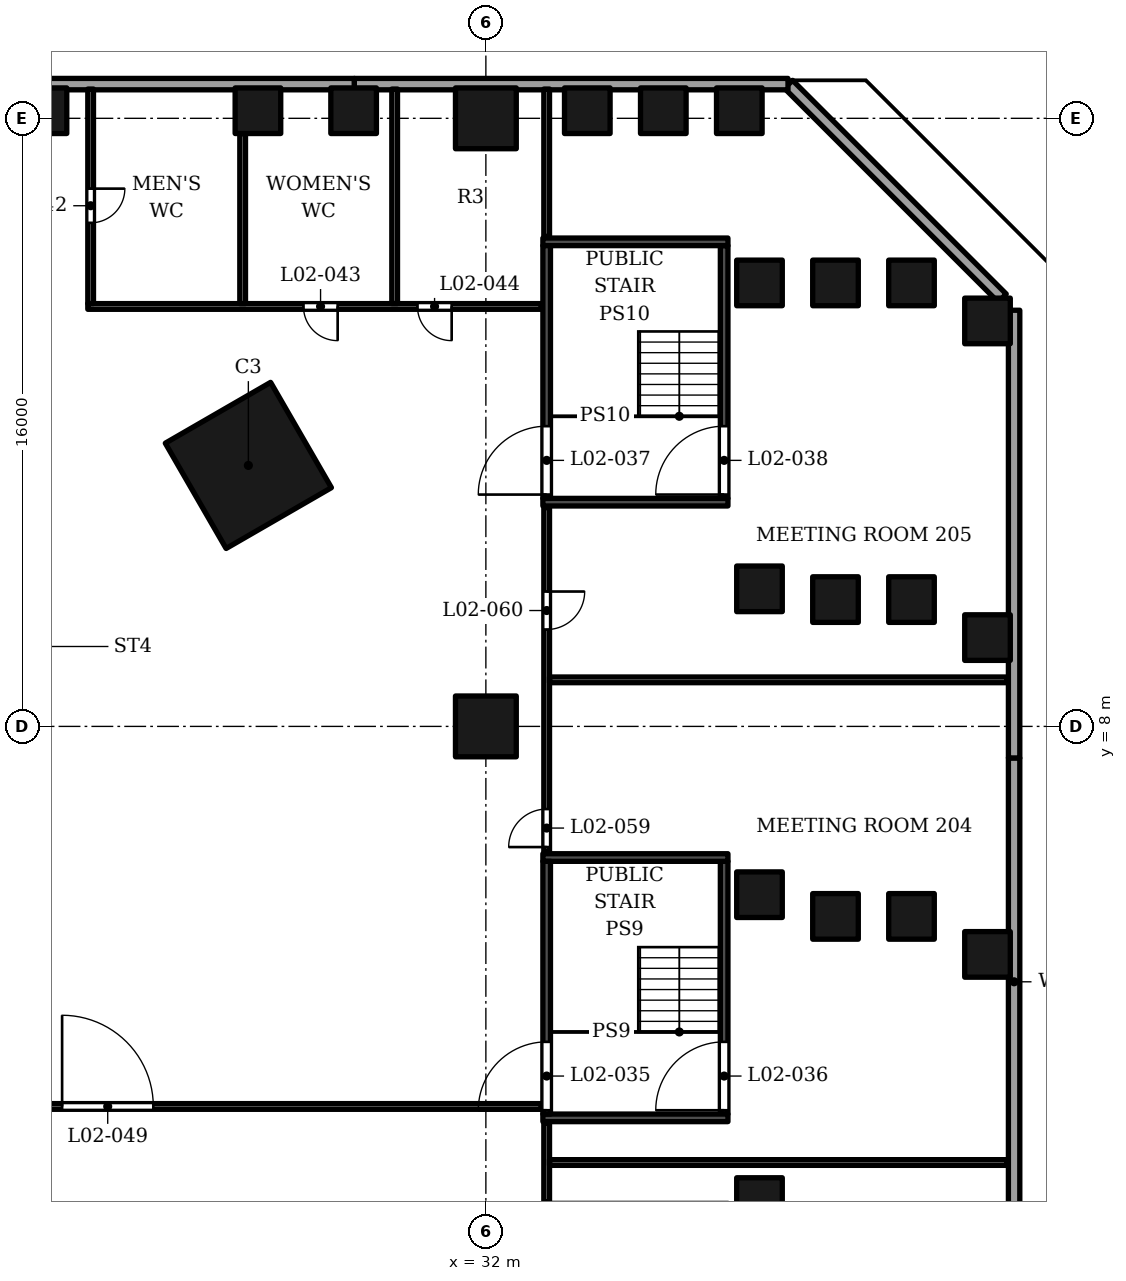
"""IFC4 building model, lengths in metres.
Left out: names, types, materials, properties, quantities, classifications, styles, units other than length and angle.
Written with IfcOpenShell. Run it as: python <this file> out.ifc"""

import sys

from ifc_helpers import new_model, si_unit, direction, frame, frame_2d, origin, origin_2d, place, context, subcontext, project, spatial, rectangle, extrude, element, fill, save


model = new_model("IFC4")
c1 = context("Model", 3, precision=1e-05, world=origin(), true_north=direction((0.0, 1.0)))
c2 = subcontext(c1, "Body", "Model", "MODEL_VIEW")
j1 = project(units=[si_unit("LENGTHUNIT", "METRE"), si_unit("PLANEANGLEUNIT", "RADIAN")], contexts=[c1])
p1 = place(None, origin())
s1 = spatial("IfcSite", under=j1, at=p1, CompositionType="ELEMENT")
p2 = place(p1, origin())
s2 = spatial("IfcBuilding", under=s1, at=p2, CompositionType="ELEMENT")
p3 = place(p2, frame((0.0, 0.0, 20.0)))
s3 = spatial("IfcBuildingStorey", under=s2, at=p3, CompositionType="ELEMENT", Elevation=20.0)
for number, where, z_axis, x_axis in (
    (1, (32.0, 8.0, 0.0), (0.0, 0.0, 1.0), (1.0, 0.0, 0.0)),
    (2, (32.0, 24.0, 0.0), (0.0, 0.0, 1.0), (1.0, 0.0, 0.0)),
):
    element("IfcColumn", number, at=place(p3, frame(where, z_axis=z_axis, x_axis=x_axis)), inside=s3, PredefinedType="COLUMN", context=c2, shape_type="SweptSolid", body=[
        extrude(rectangle(XDim=1.6, YDim=1.6, at=origin_2d()), origin(), (0.0, 0.0, 1.0), 9.0),
    ])
for number, where, z_axis, x_axis in (
    (3, (34.669, 24.2, 0.0), (0.0, 0.0, 1.0), (1.0, 0.0, 0.0)),
    (4, (39.2, 19.669, 0.0), (0.0, 0.0, 1.0), (1.0, 0.0, 0.0)),
    (5, (26.002, 24.2, 0.0), (0.0, 0.0, 1.0), (1.0, 0.0, 0.0)),
    (6, (39.2, 11.62, 0.0), (0.0, 0.0, 1.0), (1.0, 0.0, 0.0)),
    (7, (39.2, 3.572, 0.0), (0.0, 0.0, 1.0), (1.0, 0.0, 0.0)),
    (8, (39.2, -4.476, 0.0), (0.0, 0.0, 1.0), (1.0, 0.0, 0.0)),
    (9, (36.669, 24.2, 0.0), (0.0, 0.0, 1.0), (1.0, 0.0, 0.0)),
    (10, (41.2, 19.669, 0.0), (0.0, 0.0, 1.0), (1.0, 0.0, 0.0)),
    (11, (20.372, 24.2, 0.0), (0.0, 0.0, 1.0), (1.0, 0.0, 0.0)),
    (12, (28.52, 24.2, 0.0), (0.0, 0.0, 1.0), (1.0, 0.0, 0.0)),
    (13, (41.2, 11.337, 0.0), (0.0, 0.0, 1.0), (1.0, 0.0, 0.0)),
    (14, (41.2, 3.001, 0.0), (0.0, 0.0, 1.0), (1.0, 0.0, 0.0)),
    (15, (38.669, 24.2, 0.0), (0.0, 0.0, 1.0), (1.0, 0.0, 0.0)),
    (16, (43.2, 19.669, 0.0), (0.0, 0.0, 1.0), (1.0, 0.0, 0.0)),
    (17, (43.2, 11.337, 0.0), (0.0, 0.0, 1.0), (1.0, 0.0, 0.0)),
    (18, (43.2, 3.001, 0.0), (0.0, 0.0, 1.0), (1.0, 0.0, 0.0)),
    (19, (45.2, 18.669, 0.0), (0.0, 0.0, 1.0), (1.0, 0.0, 0.0)),
    (20, (45.2, 10.337, 0.0), (0.0, 0.0, 1.0), (1.0, 0.0, 0.0)),
    (21, (45.2, 2.001, 0.0), (0.0, 0.0, 1.0), (1.0, 0.0, 0.0)),
):
    element("IfcColumn", number, at=place(p3, frame(where, z_axis=z_axis, x_axis=x_axis)), inside=s3, PredefinedType="COLUMN", context=c2, shape_type="SweptSolid", body=[
        extrude(rectangle(XDim=1.2, YDim=1.2, at=origin_2d()), origin(), (0.0, 0.0, 1.0), 9.0),
    ])
p4 = place(p3, frame((25.75, 14.867, 0.0), z_axis=(0.0, 0.0, 1.0), x_axis=(-0.866025386331, -0.50000003023, 0.0)))
e22 = element("IfcColumn", 22, at=p4, inside=s3, PredefinedType="COLUMN", context=c2, shape_type="SweptSolid", body=[
    extrude(rectangle(XDim=3.2, YDim=3.2, at=origin_2d()), origin(), (0.0, 0.0, 1.0), 9.0),
])
for number, where, z_axis, x_axis in (
    (23, (45.9, -4.61, 0.0), (0.0, 0.0, 1.0), (0.0, 1.0, 0.0)),
    (24, (45.9, 7.17, 0.0), (0.0, 0.0, 1.0), (0.0, 1.0, 0.0)),
):
    element("IfcWall", number, at=place(p3, frame(where, z_axis=z_axis, x_axis=x_axis)), inside=s3, PredefinedType="SOLIDWALL", context=c2, shape_type="SweptSolid", body=[
        extrude(rectangle(XDim=11.78, YDim=0.3, at=frame_2d((5.89, 0.0))), origin(), (0.0, 0.0, 1.0), 7.6),
    ])
p5 = place(p3, frame((45.588, 19.271, 0.0), z_axis=(0.0, 0.0, 1.0), x_axis=(-0.707106781187, 0.707106781187, 0.0)))
e25 = element("IfcWall", 25, at=p5, inside=s3, PredefinedType="SOLIDWALL", context=c2, shape_type="SweptSolid", body=[
    extrude(rectangle(XDim=7.952, YDim=0.3, at=frame_2d((3.976, 0.0))), origin(), (0.0, 0.0, 1.0), 7.6),
])
for number, where, z_axis, x_axis in (
    (26, (39.95, 24.9, 0.0), (0.0, 0.0, 1.0), (-1.0, 0.0, 0.0)),
    (27, (28.536, 24.9, 0.0), (0.0, 0.0, 1.0), (-1.0, 0.0, 0.0)),
):
    element("IfcWall", number, at=place(p3, frame(where, z_axis=z_axis, x_axis=x_axis)), inside=s3, PredefinedType="SOLIDWALL", context=c2, shape_type="SweptSolid", body=[
        extrude(rectangle(XDim=11.414, YDim=0.3, at=frame_2d((5.707, 0.0))), origin(), (0.0, 0.0, 1.0), 7.6),
    ])
for number, where, z_axis, x_axis in (
    (28, (45.85, -10.395, 9.0), (0.0, 0.0, 1.0), (0.0, 1.0, 0.0)),
    (29, (45.85, 4.302, 9.0), (0.0, 0.0, 1.0), (0.0, 1.0, 0.0)),
):
    element("IfcWall", number, at=place(p3, frame(where, z_axis=z_axis, x_axis=x_axis)), inside=s3, PredefinedType="PARAPET", context=c2, shape_type="SweptSolid", body=[
        extrude(rectangle(XDim=14.698, YDim=0.3, at=frame_2d((7.349, 0.0))), origin(), (0.0, 0.0, 1.0), 1.1),
    ])
p6 = place(p3, frame((45.745, 19.042, 9.0), z_axis=(0.0, 0.0, 1.0), x_axis=(-0.707092029666, 0.7071215324, 0.0)))
e30 = element("IfcWall", 30, at=p6, inside=s3, PredefinedType="PARAPET", context=c2, shape_type="SweptSolid", body=[
    extrude(rectangle(XDim=8.275, YDim=0.3, at=frame_2d((4.138, 0.0))), origin(), (0.0, 0.0, 1.0), 1.1),
])
for number, where, z_axis, x_axis in (
    (31, (33.5, -2.3, 0.0), (0.0, 0.0, 1.0), (1.0, 0.0, 0.0)),
    (32, (33.5, 4.55, 0.0), (0.0, 0.0, 1.0), (1.0, 0.0, 0.0)),
):
    element("IfcWall", number, at=place(p3, frame(where, z_axis=z_axis, x_axis=x_axis)), inside=s3, PredefinedType="SOLIDWALL", context=c2, shape_type="SweptSolid", body=[
        extrude(rectangle(XDim=4.87, YDim=0.2, at=frame_2d((2.435, 0.0))), origin(), (0.0, 0.0, 1.0), 8.55),
    ])
p7 = place(p3, frame((33.6, -2.2, 0.0), z_axis=(0.0, 0.0, 1.0), x_axis=(0.0, 1.0, 0.0)))
e33 = element("IfcWall", 33, at=p7, inside=s3, PredefinedType="SOLIDWALL", context=c2, shape_type="SweptSolid", body=[
    extrude(rectangle(XDim=6.65, YDim=0.2, at=frame_2d((3.325, 0.0))), origin(), (0.0, 0.0, 1.0), 8.55),
])
p8 = place(p7, frame((0.1, 0.0, 0.0)))
e34 = element("IfcOpeningElement", 34, at=p8, cuts=e33, PredefinedType="OPENING", context=c2, shape_type="SweptSolid", body=[
    extrude(rectangle(XDim=1.8, YDim=2.4, at=frame_2d((0.9, 1.2))), frame((0.0, 0.11, 0.0), z_axis=(0.0, -1.0, 0.0), x_axis=(1.0, 0.0, 0.0)), (0.0, 0.0, 1.0), 0.22),
])
p9 = place(p3, frame((38.27, -2.2, 0.0), z_axis=(0.0, 0.0, 1.0), x_axis=(0.0, 1.0, 0.0)))
e35 = element("IfcWall", 35, at=p9, inside=s3, PredefinedType="SOLIDWALL", context=c2, shape_type="SweptSolid", body=[
    extrude(rectangle(XDim=6.65, YDim=0.2, at=frame_2d((3.325, 0.0))), origin(), (0.0, 0.0, 1.0), 8.55),
])
p10 = place(p9, frame((0.1, 0.0, 0.0)))
e36 = element("IfcOpeningElement", 36, at=p10, cuts=e35, PredefinedType="OPENING", context=c2, shape_type="SweptSolid", body=[
    extrude(rectangle(XDim=1.8, YDim=2.4, at=frame_2d((0.9, 1.2))), frame((0.0, 0.11, 0.0), z_axis=(0.0, -1.0, 0.0), x_axis=(1.0, 0.0, 0.0)), (0.0, 0.0, 1.0), 0.22),
])
for number, where, z_axis, x_axis in (
    (37, (33.5, 13.9, 0.0), (0.0, 0.0, 1.0), (1.0, 0.0, 0.0)),
    (38, (33.5, 20.75, 0.0), (0.0, 0.0, 1.0), (1.0, 0.0, 0.0)),
):
    element("IfcWall", number, at=place(p3, frame(where, z_axis=z_axis, x_axis=x_axis)), inside=s3, PredefinedType="SOLIDWALL", context=c2, shape_type="SweptSolid", body=[
        extrude(rectangle(XDim=4.87, YDim=0.2, at=frame_2d((2.435, 0.0))), origin(), (0.0, 0.0, 1.0), 8.55),
    ])
p11 = place(p3, frame((33.6, 14.0, 0.0), z_axis=(0.0, 0.0, 1.0), x_axis=(0.0, 1.0, 0.0)))
e39 = element("IfcWall", 39, at=p11, inside=s3, PredefinedType="SOLIDWALL", context=c2, shape_type="SweptSolid", body=[
    extrude(rectangle(XDim=6.65, YDim=0.2, at=frame_2d((3.325, 0.0))), origin(), (0.0, 0.0, 1.0), 8.55),
])
p12 = place(p11, frame((0.1, 0.0, 0.0)))
e40 = element("IfcOpeningElement", 40, at=p12, cuts=e39, PredefinedType="OPENING", context=c2, shape_type="SweptSolid", body=[
    extrude(rectangle(XDim=1.8, YDim=2.4, at=frame_2d((0.9, 1.2))), frame((0.0, 0.11, 0.0), z_axis=(0.0, -1.0, 0.0), x_axis=(1.0, 0.0, 0.0)), (0.0, 0.0, 1.0), 0.22),
])
p13 = place(p3, frame((38.27, 14.0, 0.0), z_axis=(0.0, 0.0, 1.0), x_axis=(0.0, 1.0, 0.0)))
e41 = element("IfcWall", 41, at=p13, inside=s3, PredefinedType="SOLIDWALL", context=c2, shape_type="SweptSolid", body=[
    extrude(rectangle(XDim=6.65, YDim=0.2, at=frame_2d((3.325, 0.0))), origin(), (0.0, 0.0, 1.0), 8.55),
])
p14 = place(p13, frame((0.1, 0.0, 0.0)))
e42 = element("IfcOpeningElement", 42, at=p14, cuts=e41, PredefinedType="OPENING", context=c2, shape_type="SweptSolid", body=[
    extrude(rectangle(XDim=1.8, YDim=2.4, at=frame_2d((0.9, 1.2))), frame((0.0, 0.11, 0.0), z_axis=(0.0, -1.0, 0.0), x_axis=(1.0, 0.0, 0.0)), (0.0, 0.0, 1.0), 0.22),
])
p15 = place(p3, frame((33.6, -4.51, 0.0), z_axis=(0.0, 0.0, 1.0), x_axis=(0.0, 1.0, 0.0)))
e43 = element("IfcWall", 43, at=p15, inside=s3, PredefinedType="PARTITIONING", context=c2, shape_type="SweptSolid", body=[
    extrude(rectangle(XDim=2.07, YDim=0.15, at=frame_2d((1.035, 0.0))), origin(), (0.0, 0.0, 1.0), 8.55),
])
p16 = place(p3, frame((33.675, -3.475, 0.0), z_axis=(0.0, 0.0, 1.0), x_axis=(1.0, 0.0, 0.0)))
e44 = element("IfcWall", 44, at=p16, inside=s3, PredefinedType="PARTITIONING", context=c2, shape_type="SweptSolid", body=[
    extrude(rectangle(XDim=12.045, YDim=0.15, at=frame_2d((6.022, 0.0))), origin(), (0.0, 0.0, 1.0), 7.65),
])
p17 = place(p3, frame((-33.46, -2.0, 0.0), z_axis=(0.0, 0.0, 1.0), x_axis=(1.0, 0.0, 0.0)))
e45 = element("IfcWall", 45, at=p17, inside=s3, PredefinedType="PARTITIONING", context=c2, shape_type="SweptSolid", body=[
    extrude(rectangle(XDim=66.92, YDim=0.15, at=frame_2d((33.46, 0.0))), origin(), (0.0, 0.0, 1.0), 7.35),
])
p18 = place(p17, frame((15.96, 0.0, 0.0)))
e46 = element("IfcOpeningElement", 46, at=p18, cuts=e45, PredefinedType="OPENING", context=c2, shape_type="SweptSolid", body=[
    extrude(rectangle(XDim=2.4, YDim=2.4, at=frame_2d((1.2, 1.2))), frame((0.0, 0.085, 0.0), z_axis=(0.0, -1.0, 0.0), x_axis=(1.0, 0.0, 0.0)), (0.0, 0.0, 1.0), 0.17),
])
p19 = place(p17, frame((20.71, 0.0, 0.0)))
e47 = element("IfcOpeningElement", 47, at=p19, cuts=e45, PredefinedType="OPENING", context=c2, shape_type="SweptSolid", body=[
    extrude(rectangle(XDim=2.4, YDim=2.4, at=frame_2d((1.2, 1.2))), frame((0.0, 0.085, 0.0), z_axis=(0.0, -1.0, 0.0), x_axis=(1.0, 0.0, 0.0)), (0.0, 0.0, 1.0), 0.17),
])
p20 = place(p17, frame((11.21, 0.0, 0.0)))
e48 = element("IfcOpeningElement", 48, at=p20, cuts=e45, PredefinedType="OPENING", context=c2, shape_type="SweptSolid", body=[
    extrude(rectangle(XDim=2.4, YDim=2.4, at=frame_2d((1.2, 1.2))), frame((0.0, 0.085, 0.0), z_axis=(0.0, -1.0, 0.0), x_axis=(1.0, 0.0, 0.0)), (0.0, 0.0, 1.0), 0.17),
])
p21 = place(p17, frame((49.559, 0.0, 0.0)))
e49 = element("IfcOpeningElement", 49, at=p21, cuts=e45, PredefinedType="OPENING", context=c2, shape_type="SweptSolid", body=[
    extrude(rectangle(XDim=2.4, YDim=2.4, at=frame_2d((1.2, 1.2))), frame((0.0, 0.085, 0.0), z_axis=(0.0, -1.0, 0.0), x_axis=(1.0, 0.0, 0.0)), (0.0, 0.0, 1.0), 0.17),
])
p22 = place(p17, frame((54.309, 0.0, 0.0)))
e50 = element("IfcOpeningElement", 50, at=p22, cuts=e45, PredefinedType="OPENING", context=c2, shape_type="SweptSolid", body=[
    extrude(rectangle(XDim=2.4, YDim=2.4, at=frame_2d((1.2, 1.2))), frame((0.0, 0.085, 0.0), z_axis=(0.0, -1.0, 0.0), x_axis=(1.0, 0.0, 0.0)), (0.0, 0.0, 1.0), 0.17),
])
p23 = place(p17, frame((44.809, 0.0, 0.0)))
e51 = element("IfcOpeningElement", 51, at=p23, cuts=e45, PredefinedType="OPENING", context=c2, shape_type="SweptSolid", body=[
    extrude(rectangle(XDim=2.4, YDim=2.4, at=frame_2d((1.2, 1.2))), frame((0.0, 0.085, 0.0), z_axis=(0.0, -1.0, 0.0), x_axis=(1.0, 0.0, 0.0)), (0.0, 0.0, 1.0), 0.17),
])
p24 = place(p3, frame((33.6, 4.69, 0.0), z_axis=(0.0, 0.0, 1.0), x_axis=(0.0, 1.0, 0.0)))
e52 = element("IfcWall", 52, at=p24, inside=s3, PredefinedType="PARTITIONING", context=c2, shape_type="SweptSolid", body=[
    extrude(rectangle(XDim=9.07, YDim=0.15, at=frame_2d((4.535, 0.0))), origin(), (0.0, 0.0, 1.0), 7.35),
])
p25 = place(p24, frame((0.135, 0.0, 0.0)))
e53 = element("IfcOpeningElement", 53, at=p25, cuts=e52, PredefinedType="OPENING", context=c2, shape_type="SweptSolid", body=[
    extrude(rectangle(XDim=1.0, YDim=2.1, at=frame_2d((0.5, 1.05))), frame((0.0, 0.085, 0.0), z_axis=(0.0, -1.0, 0.0), x_axis=(1.0, 0.0, 0.0)), (0.0, 0.0, 1.0), 0.17),
])
p26 = place(p24, frame((5.859, 0.0, 0.0)))
e54 = element("IfcOpeningElement", 54, at=p26, cuts=e52, PredefinedType="OPENING", context=c2, shape_type="SweptSolid", body=[
    extrude(rectangle(XDim=1.0, YDim=2.1, at=frame_2d((0.5, 1.05))), frame((0.0, 0.085, 0.0), z_axis=(0.0, -1.0, 0.0), x_axis=(1.0, 0.0, 0.0)), (0.0, 0.0, 1.0), 0.17),
])
p27 = place(p3, frame((33.675, 9.225, 0.0), z_axis=(0.0, 0.0, 1.0), x_axis=(1.0, 0.0, 0.0)))
e55 = element("IfcWall", 55, at=p27, inside=s3, PredefinedType="PARTITIONING", context=c2, shape_type="SweptSolid", body=[
    extrude(rectangle(XDim=12.045, YDim=0.15, at=frame_2d((6.022, 0.0))), origin(), (0.0, 0.0, 1.0), 7.65),
])
p28 = place(p3, frame((21.525, 19.05, 0.0), z_axis=(0.0, 0.0, 1.0), x_axis=(1.0, 0.0, 0.0)))
e56 = element("IfcWall", 56, at=p28, inside=s3, PredefinedType="PARTITIONING", context=c2, shape_type="SweptSolid", body=[
    extrude(rectangle(XDim=11.935, YDim=0.15, at=frame_2d((5.968, 0.0))), origin(), (0.0, 0.0, 1.0), 7.35),
])
p29 = place(p28, frame((5.675, 0.0, 0.0)))
e57 = element("IfcOpeningElement", 57, at=p29, cuts=e56, PredefinedType="OPENING", context=c2, shape_type="SweptSolid", body=[
    extrude(rectangle(XDim=0.9, YDim=2.1, at=frame_2d((0.45, 1.05))), frame((0.0, 0.085, 0.0), z_axis=(0.0, -1.0, 0.0), x_axis=(1.0, 0.0, 0.0)), (0.0, 0.0, 1.0), 0.17),
])
p30 = place(p28, frame((8.675, 0.0, 0.0)))
e58 = element("IfcOpeningElement", 58, at=p30, cuts=e56, PredefinedType="OPENING", context=c2, shape_type="SweptSolid", body=[
    extrude(rectangle(XDim=0.9, YDim=2.1, at=frame_2d((0.45, 1.05))), frame((0.0, 0.085, 0.0), z_axis=(0.0, -1.0, 0.0), x_axis=(1.0, 0.0, 0.0)), (0.0, 0.0, 1.0), 0.17),
])
p31 = place(p3, frame((21.6, 19.125, 0.0), z_axis=(0.0, 0.0, 1.0), x_axis=(0.0, 1.0, 0.0)))
e59 = element("IfcWall", 59, at=p31, inside=s3, PredefinedType="PARTITIONING", context=c2, shape_type="SweptSolid", body=[
    extrude(rectangle(XDim=5.645, YDim=0.15, at=frame_2d((2.823, 0.0))), origin(), (0.0, 0.0, 1.0), 7.35),
])
p32 = place(p31, frame((2.125, 0.0, 0.0)))
e60 = element("IfcOpeningElement", 60, at=p32, cuts=e59, PredefinedType="OPENING", context=c2, shape_type="SweptSolid", body=[
    extrude(rectangle(XDim=0.9, YDim=2.1, at=frame_2d((0.45, 1.05))), frame((0.0, 0.085, 0.0), z_axis=(0.0, -1.0, 0.0), x_axis=(1.0, 0.0, 0.0)), (0.0, 0.0, 1.0), 0.17),
])
p33 = place(p3, frame((25.6, 19.125, 0.0), z_axis=(0.0, 0.0, 1.0), x_axis=(0.0, 1.0, 0.0)))
e61 = element("IfcWall", 61, at=p33, inside=s3, PredefinedType="PARTITIONING", context=c2, shape_type="SweptSolid", body=[
    extrude(rectangle(XDim=4.475, YDim=0.15, at=frame_2d((2.238, 0.0))), origin(), (0.0, 0.0, 1.0), 8.55),
])
p34 = place(p3, frame((29.6, 19.125, 0.0), z_axis=(0.0, 0.0, 1.0), x_axis=(0.0, 1.0, 0.0)))
e62 = element("IfcWall", 62, at=p34, inside=s3, PredefinedType="PARTITIONING", context=c2, shape_type="SweptSolid", body=[
    extrude(rectangle(XDim=5.645, YDim=0.15, at=frame_2d((2.823, 0.0))), origin(), (0.0, 0.0, 1.0), 7.35),
])
p35 = place(p3, frame((33.6, 20.89, 0.0), z_axis=(0.0, 0.0, 1.0), x_axis=(0.0, 1.0, 0.0)))
e63 = element("IfcWall", 63, at=p35, inside=s3, PredefinedType="PARTITIONING", context=c2, shape_type="SweptSolid", body=[
    extrude(rectangle(XDim=3.88, YDim=0.15, at=frame_2d((1.94, 0.0))), origin(), (0.0, 0.0, 1.0), 7.65),
])
p36 = place(p8, origin())
e64 = element("IfcDoor", 64, at=p36, inside=s3, OperationType="DOUBLE_DOOR_SINGLE_SWING", PredefinedType="DOOR", context=c2, shape_type="SweptSolid", body=[
    extrude(rectangle(XDim=1.8, YDim=2.4, at=frame_2d((0.9, 1.2))), frame((0.0, 0.025, 0.0), z_axis=(0.0, -1.0, 0.0), x_axis=(1.0, 0.0, 0.0)), (0.0, 0.0, 1.0), 0.05),
])
fill(e34, e64)
p37 = place(p10, origin())
e65 = element("IfcDoor", 65, at=p37, inside=s3, OperationType="DOUBLE_DOOR_SINGLE_SWING", PredefinedType="DOOR", context=c2, shape_type="SweptSolid", body=[
    extrude(rectangle(XDim=1.8, YDim=2.4, at=frame_2d((0.9, 1.2))), frame((0.0, 0.025, 0.0), z_axis=(0.0, -1.0, 0.0), x_axis=(1.0, 0.0, 0.0)), (0.0, 0.0, 1.0), 0.05),
])
fill(e36, e65)
p38 = place(p12, origin())
e66 = element("IfcDoor", 66, at=p38, inside=s3, OperationType="DOUBLE_DOOR_SINGLE_SWING", PredefinedType="DOOR", context=c2, shape_type="SweptSolid", body=[
    extrude(rectangle(XDim=1.8, YDim=2.4, at=frame_2d((0.9, 1.2))), frame((0.0, 0.025, 0.0), z_axis=(0.0, -1.0, 0.0), x_axis=(1.0, 0.0, 0.0)), (0.0, 0.0, 1.0), 0.05),
])
fill(e40, e66)
p39 = place(p14, origin())
e67 = element("IfcDoor", 67, at=p39, inside=s3, OperationType="DOUBLE_DOOR_SINGLE_SWING", PredefinedType="DOOR", context=c2, shape_type="SweptSolid", body=[
    extrude(rectangle(XDim=1.8, YDim=2.4, at=frame_2d((0.9, 1.2))), frame((0.0, 0.025, 0.0), z_axis=(0.0, -1.0, 0.0), x_axis=(1.0, 0.0, 0.0)), (0.0, 0.0, 1.0), 0.05),
])
fill(e42, e67)
p40 = place(p32, origin())
e68 = element("IfcDoor", 68, at=p40, inside=s3, OperationType="SINGLE_SWING_RIGHT", PredefinedType="DOOR", context=c2, shape_type="SweptSolid", body=[
    extrude(rectangle(XDim=0.9, YDim=2.1, at=frame_2d((0.45, 1.05))), frame((0.0, 0.025, 0.0), z_axis=(0.0, -1.0, 0.0), x_axis=(1.0, 0.0, 0.0)), (0.0, 0.0, 1.0), 0.05),
])
fill(e60, e68)
p41 = place(p29, origin())
e69 = element("IfcDoor", 69, at=p41, inside=s3, OperationType="SINGLE_SWING_RIGHT", PredefinedType="DOOR", context=c2, shape_type="SweptSolid", body=[
    extrude(rectangle(XDim=0.9, YDim=2.1, at=frame_2d((0.45, 1.05))), frame((0.0, 0.025, 0.0), z_axis=(0.0, -1.0, 0.0), x_axis=(1.0, 0.0, 0.0)), (0.0, 0.0, 1.0), 0.05),
])
fill(e57, e69)
p42 = place(p30, origin())
e70 = element("IfcDoor", 70, at=p42, inside=s3, OperationType="SINGLE_SWING_RIGHT", PredefinedType="DOOR", context=c2, shape_type="SweptSolid", body=[
    extrude(rectangle(XDim=0.9, YDim=2.1, at=frame_2d((0.45, 1.05))), frame((0.0, 0.025, 0.0), z_axis=(0.0, -1.0, 0.0), x_axis=(1.0, 0.0, 0.0)), (0.0, 0.0, 1.0), 0.05),
])
fill(e58, e70)
p43 = place(p22, origin())
e71 = element("IfcDoor", 71, at=p43, inside=s3, OperationType="DOUBLE_DOOR_SINGLE_SWING", PredefinedType="DOOR", context=c2, shape_type="SweptSolid", body=[
    extrude(rectangle(XDim=2.4, YDim=2.4, at=frame_2d((1.2, 1.2))), frame((0.0, 0.025, 0.0), z_axis=(0.0, -1.0, 0.0), x_axis=(1.0, 0.0, 0.0)), (0.0, 0.0, 1.0), 0.05),
])
fill(e50, e71)
p44 = place(p25, origin())
e72 = element("IfcDoor", 72, at=p44, inside=s3, OperationType="SINGLE_SWING_LEFT", PredefinedType="DOOR", context=c2, shape_type="SweptSolid", body=[
    extrude(rectangle(XDim=1.0, YDim=2.1, at=frame_2d((0.5, 1.05))), frame((0.0, 0.025, 0.0), z_axis=(0.0, -1.0, 0.0), x_axis=(1.0, 0.0, 0.0)), (0.0, 0.0, 1.0), 0.05),
])
fill(e53, e72)
p45 = place(p26, origin())
e73 = element("IfcDoor", 73, at=p45, inside=s3, OperationType="SINGLE_SWING_RIGHT", PredefinedType="DOOR", context=c2, shape_type="SweptSolid", body=[
    extrude(rectangle(XDim=1.0, YDim=2.1, at=frame_2d((0.5, 1.05))), frame((0.0, 0.025, 0.0), z_axis=(0.0, -1.0, 0.0), x_axis=(1.0, 0.0, 0.0)), (0.0, 0.0, 1.0), 0.05),
])
fill(e54, e73)
save(model, sys.argv[1])
